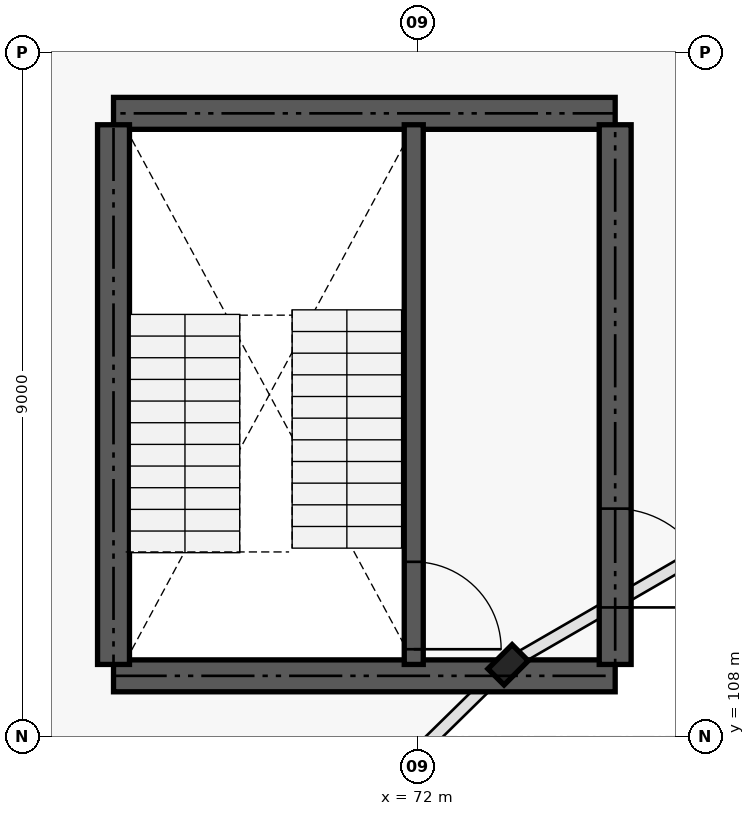
"""IFC4 building model, lengths in metres.
Left out: names, types, materials, properties, quantities, classifications, styles, units other than length and angle.
Written with IfcOpenShell. Run it as: python <this file> out.ifc"""

import sys

from ifc_helpers import new_model, si_unit, direction, frame, frame_2d, origin, origin_2d, place, context, subcontext, project, spatial, rectangle, i_section, extrude, element, fill, save


model = new_model("IFC4")
c1 = context("Model", 3, precision=1e-05, world=origin(), true_north=direction((0.0, 1.0)))
c2 = subcontext(c1, "Body", "Model", "MODEL_VIEW")
j1 = project(units=[si_unit("LENGTHUNIT", "METRE"), si_unit("PLANEANGLEUNIT", "RADIAN")], contexts=[c1])
p1 = place(None, origin())
s1 = spatial("IfcSite", under=j1, at=p1, CompositionType="ELEMENT")
p2 = place(p1, origin())
s2 = spatial("IfcBuilding", under=s1, at=p2, CompositionType="ELEMENT")
p3 = place(p2, frame((0.0, 0.0, 5.4)))
s3 = spatial("IfcBuildingStorey", under=s2, at=p3, CompositionType="ELEMENT", Elevation=5.4)
p4 = place(p3, frame((73.191, 108.945, 0.0), z_axis=(0.0, 0.0, 1.0), x_axis=(-0.707106781187, 0.707106781187, 0.0)))
e1 = element("IfcColumn", 1, at=p4, inside=s3, PredefinedType="COLUMN", context=c2, shape_type="SweptSolid", body=[
    extrude(i_section(OverallWidth=0.3, OverallDepth=0.45, WebThickness=0.014, FlangeThickness=0.026, FilletRadius=0.027, at=origin_2d()), origin(), (0.0, 0.0, 1.0), 4.2),
])
for number, where, z_axis, x_axis in (
    (2, (68.0, 108.8, 0.0), (0.0, 0.0, 1.0), (1.0, 0.0, 0.0)),
    (3, (68.0, 116.2, 0.0), (0.0, 0.0, 1.0), (1.0, 0.0, 0.0)),
):
    element("IfcWall", number, at=place(p3, frame(where, z_axis=z_axis, x_axis=x_axis)), inside=s3, PredefinedType="SHEAR", context=c2, shape_type="SweptSolid", body=[
        extrude(rectangle(XDim=6.6, YDim=0.42, at=frame_2d((3.3, 0.0))), origin(), (0.0, 0.0, 1.0), 4.2),
    ])
p5 = place(p3, frame((68.0, 108.95, 0.0), z_axis=(0.0, 0.0, 1.0), x_axis=(0.0, 1.0, 0.0)))
e4 = element("IfcWall", 4, at=p5, inside=s3, PredefinedType="SHEAR", context=c2, shape_type="SweptSolid", body=[
    extrude(rectangle(XDim=7.1, YDim=0.42, at=frame_2d((3.55, 0.0))), origin(), (0.0, 0.0, 1.0), 4.2),
])
p6 = place(p3, frame((74.6, 108.95, 0.0), z_axis=(0.0, 0.0, 1.0), x_axis=(0.0, 1.0, 0.0)))
e5 = element("IfcWall", 5, at=p6, inside=s3, PredefinedType="SHEAR", context=c2, shape_type="SweptSolid", body=[
    extrude(rectangle(XDim=7.1, YDim=0.42, at=frame_2d((3.55, 0.0))), origin(), (0.0, 0.0, 1.0), 4.2),
])
p7 = place(p6, frame((0.75, 0.0, 0.0)))
e6 = element("IfcOpeningElement", 6, at=p7, cuts=e5, PredefinedType="OPENING", context=c2, shape_type="SweptSolid", body=[
    extrude(rectangle(XDim=1.3, YDim=2.15, at=frame_2d((0.65, 1.075))), frame((0.0, 0.22, 0.0), z_axis=(0.0, -1.0, 0.0), x_axis=(1.0, 0.0, 0.0)), (0.0, 0.0, 1.0), 0.44),
])
p8 = place(p3, frame((71.95, 108.95, 0.0), z_axis=(0.0, 0.0, 1.0), x_axis=(0.0, 1.0, 0.0)))
e7 = element("IfcWall", 7, at=p8, inside=s3, PredefinedType="SHEAR", context=c2, shape_type="SweptSolid", body=[
    extrude(rectangle(XDim=7.1, YDim=0.25, at=frame_2d((3.55, 0.0))), origin(), (0.0, 0.0, 1.0), 4.2),
])
p9 = place(p8, frame((0.2, 0.0, 0.0)))
e8 = element("IfcOpeningElement", 8, at=p9, cuts=e7, PredefinedType="OPENING", context=c2, shape_type="SweptSolid", body=[
    extrude(rectangle(XDim=1.15, YDim=2.15, at=frame_2d((0.575, 1.075))), frame((0.0, 0.135, 0.0), z_axis=(0.0, -1.0, 0.0), x_axis=(1.0, 0.0, 0.0)), (0.0, 0.0, 1.0), 0.27),
])
p10 = place(p7, frame((1.3, 0.0, 0.0), z_axis=(0.0, 0.0, 1.0), x_axis=(-1.0, 0.0, 0.0)))
e9 = element("IfcDoor", 9, at=p10, inside=s3, OperationType="DOUBLE_DOOR_SINGLE_SWING", PredefinedType="DOOR", context=c2, shape_type="SweptSolid", body=[
    extrude(rectangle(XDim=1.3, YDim=2.15, at=frame_2d((0.65, 1.075))), frame((0.0, 0.025, 0.0), z_axis=(0.0, -1.0, 0.0), x_axis=(1.0, 0.0, 0.0)), (0.0, 0.0, 1.0), 0.05),
])
fill(e6, e9)
p11 = place(p9, frame((1.15, 0.0, 0.0), z_axis=(0.0, 0.0, 1.0), x_axis=(-1.0, 0.0, 0.0)))
e10 = element("IfcDoor", 10, at=p11, inside=s3, OperationType="SINGLE_SWING_LEFT", PredefinedType="DOOR", context=c2, shape_type="SweptSolid", body=[
    extrude(rectangle(XDim=1.15, YDim=2.15, at=frame_2d((0.575, 1.075))), frame((0.0, 0.025, 0.0), z_axis=(0.0, -1.0, 0.0), x_axis=(1.0, 0.0, 0.0)), (0.0, 0.0, 1.0), 0.05),
])
fill(e8, e10)
save(model, sys.argv[1])
